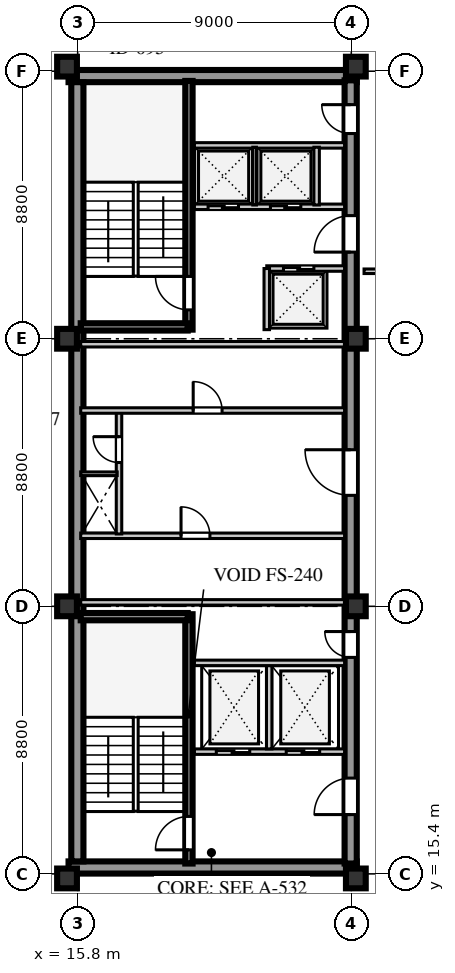
"""IFC4 building model, lengths in metres.
Left out: names, types, materials, properties, quantities, classifications, styles, units other than length and angle.
Written with IfcOpenShell. Run it as: python <this file> out.ifc"""

import sys

from ifc_helpers import new_model, si_unit, direction, frame, frame_2d, origin, origin_2d, place, context, subcontext, project, spatial, rectangle, extrude, element, fill, save


model = new_model("IFC4")
c1 = context("Model", 3, precision=1e-05, world=origin(), true_north=direction((0.0, 1.0)))
c2 = subcontext(c1, "Body", "Model", "MODEL_VIEW")
j1 = project(units=[si_unit("LENGTHUNIT", "METRE"), si_unit("PLANEANGLEUNIT", "RADIAN")], contexts=[c1])
p1 = place(None, origin())
s1 = spatial("IfcSite", under=j1, at=p1, CompositionType="ELEMENT")
p2 = place(p1, origin())
s2 = spatial("IfcBuilding", under=s1, at=p2, CompositionType="ELEMENT")
p3 = place(p2, frame((0.0, 0.0, 245.3)))
s3 = spatial("IfcBuildingStorey", under=s2, at=p3, CompositionType="ELEMENT", Elevation=245.3)
for number, where, z_axis, x_axis in (
    (1, (15.5, 15.61, 0.0), (0.0, 0.0, 1.0), (1.0, 0.0, 0.0)),
    (2, (15.5, 41.64, 0.0), (0.0, 0.0, 1.0), (1.0, 0.0, 0.0)),
):
    element("IfcWall", number, at=place(p3, frame(where, z_axis=z_axis, x_axis=x_axis)), inside=s3, PredefinedType="SHEAR", context=c2, shape_type="SweptSolid", body=[
        extrude(rectangle(XDim=9.48, YDim=0.4, at=frame_2d((4.74, 0.0))), origin(), (0.0, 0.0, 1.0), 3.66),
    ])
p4 = place(p3, frame((15.79, 15.81, 0.0), z_axis=(0.0, 0.0, 1.0), x_axis=(0.0, 1.0, 0.0)))
e3 = element("IfcWall", 3, at=p4, inside=s3, PredefinedType="SHEAR", context=c2, shape_type="SweptSolid", body=[
    extrude(rectangle(XDim=25.63, YDim=0.4, at=frame_2d((12.815, 0.0))), origin(), (0.0, 0.0, 1.0), 3.66),
])
p5 = place(p3, frame((24.78, 15.74, 0.0), z_axis=(0.0, 0.0, 1.0), x_axis=(0.0, 1.0, 0.0)))
e4 = element("IfcWall", 4, at=p5, inside=s3, PredefinedType="SHEAR", context=c2, shape_type="SweptSolid", body=[
    extrude(rectangle(XDim=25.76, YDim=0.4, at=frame_2d((12.88, 0.0))), origin(), (0.0, 0.0, 1.0), 3.66),
])
p6 = place(p5, frame((1.61, 0.0, 0.0)))
e5 = element("IfcOpeningElement", 5, at=p6, cuts=e4, PredefinedType="OPENING", context=c2, shape_type="SweptSolid", body=[
    extrude(rectangle(XDim=1.2, YDim=2.1, at=frame_2d((0.6, 1.05))), frame((0.0, 0.21, 0.0), z_axis=(0.0, -1.0, 0.0), x_axis=(1.0, 0.0, 0.0)), (0.0, 0.0, 1.0), 0.42),
])
p7 = place(p5, frame((6.78, 0.0, 0.0)))
e6 = element("IfcOpeningElement", 6, at=p7, cuts=e4, PredefinedType="OPENING", context=c2, shape_type="SweptSolid", body=[
    extrude(rectangle(XDim=0.85, YDim=2.06, at=frame_2d((0.425, 1.03))), frame((0.0, 0.21, 0.0), z_axis=(0.0, -1.0, 0.0), x_axis=(1.0, 0.0, 0.0)), (0.0, 0.0, 1.0), 0.42),
])
p8 = place(p5, frame((12.11, 0.0, 0.0)))
e7 = element("IfcOpeningElement", 7, at=p8, cuts=e4, PredefinedType="OPENING", context=c2, shape_type="SweptSolid", body=[
    extrude(rectangle(XDim=1.5, YDim=2.12, at=frame_2d((0.75, 1.06))), frame((0.0, 0.21, 0.0), z_axis=(0.0, -1.0, 0.0), x_axis=(1.0, 0.0, 0.0)), (0.0, 0.0, 1.0), 0.42),
])
p9 = place(p5, frame((20.11, 0.0, 0.0)))
e8 = element("IfcOpeningElement", 8, at=p9, cuts=e4, PredefinedType="OPENING", context=c2, shape_type="SweptSolid", body=[
    extrude(rectangle(XDim=1.2, YDim=2.12, at=frame_2d((0.6, 1.06))), frame((0.0, 0.21, 0.0), z_axis=(0.0, -1.0, 0.0), x_axis=(1.0, 0.0, 0.0)), (0.0, 0.0, 1.0), 0.42),
])
p10 = place(p5, frame((24.01, 0.0, 0.0)))
e9 = element("IfcOpeningElement", 9, at=p10, cuts=e4, PredefinedType="OPENING", context=c2, shape_type="SweptSolid", body=[
    extrude(rectangle(XDim=0.95, YDim=2.1, at=frame_2d((0.475, 1.05))), frame((0.0, 0.21, 0.0), z_axis=(0.0, -1.0, 0.0), x_axis=(1.0, 0.0, 0.0)), (0.0, 0.0, 1.0), 0.42),
])
for number, where, z_axis, x_axis in (
    (10, (15.45, 15.25, 0.0), (0.0, 0.0, 1.0), (1.0, 0.0, 0.0)),
    (11, (15.45, 24.2, 0.0), (0.0, 0.0, 1.0), (1.0, 0.0, 0.0)),
    (12, (15.45, 33.0, 0.0), (0.0, 0.0, 1.0), (1.0, 0.0, 0.0)),
    (13, (15.45, 41.95, 0.0), (0.0, 0.0, 1.0), (1.0, 0.0, 0.0)),
    (14, (24.95, 15.25, 0.0), (0.0, 0.0, 1.0), (1.0, 0.0, 0.0)),
    (15, (24.95, 24.2, 0.0), (0.0, 0.0, 1.0), (1.0, 0.0, 0.0)),
    (16, (24.95, 33.0, 0.0), (0.0, 0.0, 1.0), (1.0, 0.0, 0.0)),
    (17, (24.95, 41.95, 0.0), (0.0, 0.0, 1.0), (1.0, 0.0, 0.0)),
):
    element("IfcColumn", number, at=place(p3, frame(where, z_axis=z_axis, x_axis=x_axis)), inside=s3, PredefinedType="COLUMN", context=c2, shape_type="SweptSolid", body=[
        extrude(rectangle(XDim=0.65, YDim=0.65, at=origin_2d()), origin(), (0.0, 0.0, 1.0), 3.66),
    ])
p11 = place(p3, frame((19.46, 15.74, 0.0), z_axis=(0.0, 0.0, 1.0), x_axis=(0.0, 1.0, 0.0)))
e18 = element("IfcWall", 18, at=p11, inside=s3, PredefinedType="SHEAR", context=c2, shape_type="SweptSolid", body=[
    extrude(rectangle(XDim=8.2, YDim=0.24, at=frame_2d((4.1, 0.0))), origin(), (0.0, 0.0, 1.0), 3.9),
])
p12 = place(p11, frame((0.45, 0.0, 0.0)))
e19 = element("IfcOpeningElement", 19, at=p12, cuts=e18, PredefinedType="OPENING", context=c2, shape_type="SweptSolid", body=[
    extrude(rectangle(XDim=1.1, YDim=2.1, at=frame_2d((0.55, 1.05))), frame((0.0, 0.13, 0.0), z_axis=(0.0, -1.0, 0.0), x_axis=(1.0, 0.0, 0.0)), (0.0, 0.0, 1.0), 0.26),
])
p13 = place(p3, frame((15.9, 23.86, 0.0), z_axis=(0.0, 0.0, 1.0), x_axis=(1.0, 0.0, 0.0)))
e20 = element("IfcWall", 20, at=p13, inside=s3, PredefinedType="SHEAR", context=c2, shape_type="SweptSolid", body=[
    extrude(rectangle(XDim=3.52, YDim=0.24, at=frame_2d((1.76, 0.0))), origin(), (0.0, 0.0, 1.0), 3.9),
])
p14 = place(p3, frame((19.64, 19.42, 0.0), z_axis=(0.0, 0.0, 1.0), x_axis=(1.0, 0.0, 0.0)))
e21 = element("IfcWall", 21, at=p14, inside=s3, PredefinedType="SOLIDWALL", context=c2, shape_type="SweptSolid", body=[
    extrude(rectangle(XDim=4.94, YDim=0.18, at=frame_2d((2.47, 0.0))), origin(), (0.0, 0.0, 1.0), 3.66),
])
p15 = place(p14, frame((0.72, 0.0, 0.0)))
e22 = element("IfcOpeningElement", 22, at=p15, cuts=e21, PredefinedType="OPENING", context=c2, shape_type="SweptSolid", body=[
    extrude(rectangle(XDim=1.1, YDim=2.1, at=frame_2d((0.55, 1.05))), frame((0.0, 0.1, 0.0), z_axis=(0.0, -1.0, 0.0), x_axis=(1.0, 0.0, 0.0)), (0.0, 0.0, 1.0), 0.2),
])
p16 = place(p14, frame((3.02, 0.0, 0.0)))
e23 = element("IfcOpeningElement", 23, at=p16, cuts=e21, PredefinedType="OPENING", context=c2, shape_type="SweptSolid", body=[
    extrude(rectangle(XDim=1.1, YDim=2.1, at=frame_2d((0.55, 1.05))), frame((0.0, 0.1, 0.0), z_axis=(0.0, -1.0, 0.0), x_axis=(1.0, 0.0, 0.0)), (0.0, 0.0, 1.0), 0.2),
])
p17 = place(p3, frame((22.1, 19.51, 0.0), z_axis=(0.0, 0.0, 1.0), x_axis=(0.0, 1.0, 0.0)))
e24 = element("IfcWall", 24, at=p17, inside=s3, PredefinedType="SOLIDWALL", context=c2, shape_type="SweptSolid", body=[
    extrude(rectangle(XDim=2.74, YDim=0.18, at=frame_2d((1.37, 0.0))), origin(), (0.0, 0.0, 1.0), 3.66),
])
p18 = place(p3, frame((19.64, 22.34, 0.0), z_axis=(0.0, 0.0, 1.0), x_axis=(1.0, 0.0, 0.0)))
e25 = element("IfcWall", 25, at=p18, inside=s3, PredefinedType="SOLIDWALL", context=c2, shape_type="SweptSolid", body=[
    extrude(rectangle(XDim=4.94, YDim=0.18, at=frame_2d((2.47, 0.0))), origin(), (0.0, 0.0, 1.0), 3.66),
])
p19 = place(p3, frame((15.9, 26.52, 0.0), z_axis=(0.0, 0.0, 1.0), x_axis=(1.0, 0.0, 0.0)))
e26 = element("IfcWall", 26, at=p19, inside=s3, PredefinedType="SOLIDWALL", context=c2, shape_type="SweptSolid", body=[
    extrude(rectangle(XDim=8.68, YDim=0.18, at=frame_2d((4.34, 0.0))), origin(), (0.0, 0.0, 1.0), 3.66),
])
p20 = place(p19, frame((3.3, 0.0, 0.0)))
e27 = element("IfcOpeningElement", 27, at=p20, cuts=e26, PredefinedType="OPENING", context=c2, shape_type="SweptSolid", body=[
    extrude(rectangle(XDim=0.95, YDim=2.1, at=frame_2d((0.475, 1.05))), frame((0.0, 0.1, 0.0), z_axis=(0.0, -1.0, 0.0), x_axis=(1.0, 0.0, 0.0)), (0.0, 0.0, 1.0), 0.2),
])
p21 = place(p3, frame((15.9, 24.33, 0.0), z_axis=(0.0, 0.0, 1.0), x_axis=(1.0, 0.0, 0.0)))
e28 = element("IfcWall", 28, at=p21, inside=s3, PredefinedType="SOLIDWALL", context=c2, shape_type="SweptSolid", body=[
    extrude(rectangle(XDim=8.68, YDim=0.18, at=frame_2d((4.34, 0.0))), origin(), (0.0, 0.0, 1.0), 3.06),
])
p22 = place(p3, frame((17.16, 26.58, 0.0), z_axis=(0.0, 0.0, 1.0), x_axis=(0.0, 1.0, 0.0)))
e29 = element("IfcWall", 29, at=p22, inside=s3, PredefinedType="SOLIDWALL", context=c2, shape_type="SweptSolid", body=[
    extrude(rectangle(XDim=4.02, YDim=0.18, at=frame_2d((2.01, 0.0))), origin(), (0.0, 0.0, 1.0), 3.66),
])
p23 = place(p22, frame((2.35, 0.0, 0.0)))
e30 = element("IfcOpeningElement", 30, at=p23, cuts=e29, PredefinedType="OPENING", context=c2, shape_type="SweptSolid", body=[
    extrude(rectangle(XDim=0.85, YDim=2.06, at=frame_2d((0.425, 1.03))), frame((0.0, 0.1, 0.0), z_axis=(0.0, -1.0, 0.0), x_axis=(1.0, 0.0, 0.0)), (0.0, 0.0, 1.0), 0.2),
])
p24 = place(p3, frame((15.9, 28.56, 0.0), z_axis=(0.0, 0.0, 1.0), x_axis=(1.0, 0.0, 0.0)))
e31 = element("IfcWall", 31, at=p24, inside=s3, PredefinedType="PARTITIONING", context=c2, shape_type="SweptSolid", body=[
    extrude(rectangle(XDim=1.2, YDim=0.12, at=frame_2d((0.6, 0.0))), origin(), (0.0, 0.0, 1.0), 3.66),
])
p25 = place(p3, frame((15.9, 30.64, 0.0), z_axis=(0.0, 0.0, 1.0), x_axis=(1.0, 0.0, 0.0)))
e32 = element("IfcWall", 32, at=p25, inside=s3, PredefinedType="SOLIDWALL", context=c2, shape_type="SweptSolid", body=[
    extrude(rectangle(XDim=8.68, YDim=0.18, at=frame_2d((4.34, 0.0))), origin(), (0.0, 0.0, 1.0), 3.66),
])
p26 = place(p25, frame((3.7, 0.0, 0.0)))
e33 = element("IfcOpeningElement", 33, at=p26, cuts=e32, PredefinedType="OPENING", context=c2, shape_type="SweptSolid", body=[
    extrude(rectangle(XDim=0.95, YDim=2.1, at=frame_2d((0.475, 1.05))), frame((0.0, 0.1, 0.0), z_axis=(0.0, -1.0, 0.0), x_axis=(1.0, 0.0, 0.0)), (0.0, 0.0, 1.0), 0.2),
])
p27 = place(p3, frame((15.9, 32.82, 0.0), z_axis=(0.0, 0.0, 1.0), x_axis=(1.0, 0.0, 0.0)))
e34 = element("IfcWall", 34, at=p27, inside=s3, PredefinedType="SOLIDWALL", context=c2, shape_type="SweptSolid", body=[
    extrude(rectangle(XDim=8.68, YDim=0.18, at=frame_2d((4.34, 0.0))), origin(), (0.0, 0.0, 1.0), 3.06),
])
p28 = place(p3, frame((19.46, 33.3, 0.0), z_axis=(0.0, 0.0, 1.0), x_axis=(0.0, 1.0, 0.0)))
e35 = element("IfcWall", 35, at=p28, inside=s3, PredefinedType="SHEAR", context=c2, shape_type="SweptSolid", body=[
    extrude(rectangle(XDim=8.18, YDim=0.24, at=frame_2d((4.09, 0.0))), origin(), (0.0, 0.0, 1.0), 3.9),
])
p29 = place(p28, frame((0.65, 0.0, 0.0)))
e36 = element("IfcOpeningElement", 36, at=p29, cuts=e35, PredefinedType="OPENING", context=c2, shape_type="SweptSolid", body=[
    extrude(rectangle(XDim=1.1, YDim=2.1, at=frame_2d((0.55, 1.05))), frame((0.0, 0.13, 0.0), z_axis=(0.0, -1.0, 0.0), x_axis=(1.0, 0.0, 0.0)), (0.0, 0.0, 1.0), 0.26),
])
p30 = place(p3, frame((15.9, 33.39, 0.0), z_axis=(0.0, 0.0, 1.0), x_axis=(1.0, 0.0, 0.0)))
e37 = element("IfcWall", 37, at=p30, inside=s3, PredefinedType="SHEAR", context=c2, shape_type="SweptSolid", body=[
    extrude(rectangle(XDim=3.52, YDim=0.24, at=frame_2d((1.76, 0.0))), origin(), (0.0, 0.0, 1.0), 3.9),
])
p31 = place(p3, frame((22.02, 35.31, 0.0), z_axis=(0.0, 0.0, 1.0), x_axis=(1.0, 0.0, 0.0)))
e38 = element("IfcWall", 38, at=p31, inside=s3, PredefinedType="SOLIDWALL", context=c2, shape_type="SweptSolid", body=[
    extrude(rectangle(XDim=2.56, YDim=0.18, at=frame_2d((1.28, 0.0))), origin(), (0.0, 0.0, 1.0), 3.66),
])
p32 = place(p31, frame((0.55, 0.0, 0.0)))
e39 = element("IfcOpeningElement", 39, at=p32, cuts=e38, PredefinedType="OPENING", context=c2, shape_type="SweptSolid", body=[
    extrude(rectangle(XDim=1.0, YDim=2.1, at=frame_2d((0.5, 1.05))), frame((0.0, 0.1, 0.0), z_axis=(0.0, -1.0, 0.0), x_axis=(1.0, 0.0, 0.0)), (0.0, 0.0, 1.0), 0.2),
])
p33 = place(p3, frame((22.02, 33.3, 0.0), z_axis=(0.0, 0.0, 1.0), x_axis=(0.0, 1.0, 0.0)))
e40 = element("IfcWall", 40, at=p33, inside=s3, PredefinedType="SOLIDWALL", context=c2, shape_type="SweptSolid", body=[
    extrude(rectangle(XDim=2.01, YDim=0.18, at=frame_2d((1.005, 0.0))), origin(), (0.0, 0.0, 1.0), 3.66),
])
p34 = place(p3, frame((19.64, 37.34, 0.0), z_axis=(0.0, 0.0, 1.0), x_axis=(1.0, 0.0, 0.0)))
e41 = element("IfcWall", 41, at=p34, inside=s3, PredefinedType="SOLIDWALL", context=c2, shape_type="SweptSolid", body=[
    extrude(rectangle(XDim=4.94, YDim=0.18, at=frame_2d((2.47, 0.0))), origin(), (0.0, 0.0, 1.0), 3.66),
])
p35 = place(p34, frame((0.45, 0.0, 0.0)))
e42 = element("IfcOpeningElement", 42, at=p35, cuts=e41, PredefinedType="OPENING", context=c2, shape_type="SweptSolid", body=[
    extrude(rectangle(XDim=1.0, YDim=2.1, at=frame_2d((0.5, 1.05))), frame((0.0, 0.1, 0.0), z_axis=(0.0, -1.0, 0.0), x_axis=(1.0, 0.0, 0.0)), (0.0, 0.0, 1.0), 0.2),
])
p36 = place(p34, frame((2.5, 0.0, 0.0)))
e43 = element("IfcOpeningElement", 43, at=p36, cuts=e41, PredefinedType="OPENING", context=c2, shape_type="SweptSolid", body=[
    extrude(rectangle(XDim=1.0, YDim=2.1, at=frame_2d((0.5, 1.05))), frame((0.0, 0.1, 0.0), z_axis=(0.0, -1.0, 0.0), x_axis=(1.0, 0.0, 0.0)), (0.0, 0.0, 1.0), 0.2),
])
p37 = place(p3, frame((19.64, 39.36, 0.0), z_axis=(0.0, 0.0, 1.0), x_axis=(1.0, 0.0, 0.0)))
e44 = element("IfcWall", 44, at=p37, inside=s3, PredefinedType="SOLIDWALL", context=c2, shape_type="SweptSolid", body=[
    extrude(rectangle(XDim=4.94, YDim=0.18, at=frame_2d((2.47, 0.0))), origin(), (0.0, 0.0, 1.0), 3.66),
])
p38 = place(p3, frame((21.62, 37.4, 0.0), z_axis=(0.0, 0.0, 1.0), x_axis=(0.0, 1.0, 0.0)))
e45 = element("IfcWall", 45, at=p38, inside=s3, PredefinedType="PARTITIONING", context=c2, shape_type="SweptSolid", body=[
    extrude(rectangle(XDim=1.9, YDim=0.12, at=frame_2d((0.95, 0.0))), origin(), (0.0, 0.0, 1.0), 3.66),
])
p39 = place(p3, frame((23.66, 37.4, 0.0), z_axis=(0.0, 0.0, 1.0), x_axis=(0.0, 1.0, 0.0)))
e46 = element("IfcWall", 46, at=p39, inside=s3, PredefinedType="SOLIDWALL", context=c2, shape_type="SweptSolid", body=[
    extrude(rectangle(XDim=1.9, YDim=0.18, at=frame_2d((0.95, 0.0))), origin(), (0.0, 0.0, 1.0), 3.66),
])
p40 = place(p3, frame((25.22, 35.22, 0.0), z_axis=(0.0, 0.0, 1.0), x_axis=(1.0, 0.0, 0.0)))
e47 = element("IfcWall", 47, at=p40, inside=s3, PredefinedType="PARTITIONING", context=c2, shape_type="SweptSolid", body=[
    extrude(rectangle(XDim=9.5, YDim=0.15, at=frame_2d((4.75, 0.0))), origin(), (0.0, 0.0, 1.0), 3.66),
])
p41 = place(p40, frame((1.8, 0.0, 0.0)))
e48 = element("IfcOpeningElement", 48, at=p41, cuts=e47, PredefinedType="OPENING", context=c2, shape_type="SweptSolid", body=[
    extrude(rectangle(XDim=1.1, YDim=2.08, at=frame_2d((0.55, 1.04))), frame((0.0, 0.085, 0.0), z_axis=(0.0, -1.0, 0.0), x_axis=(1.0, 0.0, 0.0)), (0.0, 0.0, 1.0), 0.17),
])
p42 = place(p12, origin())
e49 = element("IfcDoor", 49, at=p42, inside=s3, OperationType="SINGLE_SWING_LEFT", PredefinedType="DOOR", context=c2, shape_type="SweptSolid", body=[
    extrude(rectangle(XDim=1.1, YDim=2.1, at=frame_2d((0.55, 1.05))), frame((0.0, 0.025, 0.0), z_axis=(0.0, -1.0, 0.0), x_axis=(1.0, 0.0, 0.0)), (0.0, 0.0, 1.0), 0.05),
])
fill(e19, e49)
p43 = place(p15, origin())
e50 = element("IfcDoor", 50, at=p43, inside=s3, OperationType="DOUBLE_DOOR_SLIDING", PredefinedType="DOOR", context=c2, shape_type="SweptSolid", body=[
    extrude(rectangle(XDim=1.1, YDim=2.1, at=frame_2d((0.55, 1.05))), frame((0.0, 0.025, 0.0), z_axis=(0.0, -1.0, 0.0), x_axis=(1.0, 0.0, 0.0)), (0.0, 0.0, 1.0), 0.05),
])
fill(e22, e50)
p44 = place(p16, origin())
e51 = element("IfcDoor", 51, at=p44, inside=s3, OperationType="DOUBLE_DOOR_SLIDING", PredefinedType="DOOR", context=c2, shape_type="SweptSolid", body=[
    extrude(rectangle(XDim=1.1, YDim=2.1, at=frame_2d((0.55, 1.05))), frame((0.0, 0.025, 0.0), z_axis=(0.0, -1.0, 0.0), x_axis=(1.0, 0.0, 0.0)), (0.0, 0.0, 1.0), 0.05),
])
fill(e23, e51)
p45 = place(p6, frame((1.2, 0.0, 0.0), z_axis=(0.0, 0.0, 1.0), x_axis=(-1.0, 0.0, 0.0)))
e52 = element("IfcDoor", 52, at=p45, inside=s3, OperationType="SINGLE_SWING_RIGHT", PredefinedType="DOOR", context=c2, shape_type="SweptSolid", body=[
    extrude(rectangle(XDim=1.2, YDim=2.1, at=frame_2d((0.6, 1.05))), frame((0.0, 0.025, 0.0), z_axis=(0.0, -1.0, 0.0), x_axis=(1.0, 0.0, 0.0)), (0.0, 0.0, 1.0), 0.05),
])
fill(e5, e52)
p46 = place(p7, frame((0.85, 0.0, 0.0), z_axis=(0.0, 0.0, 1.0), x_axis=(-1.0, 0.0, 0.0)))
e53 = element("IfcDoor", 53, at=p46, inside=s3, OperationType="SINGLE_SWING_LEFT", PredefinedType="DOOR", context=c2, shape_type="SweptSolid", body=[
    extrude(rectangle(XDim=0.85, YDim=2.06, at=frame_2d((0.425, 1.03))), frame((0.0, 0.025, 0.0), z_axis=(0.0, -1.0, 0.0), x_axis=(1.0, 0.0, 0.0)), (0.0, 0.0, 1.0), 0.05),
])
fill(e6, e53)
p47 = place(p20, origin())
e54 = element("IfcDoor", 54, at=p47, inside=s3, OperationType="SINGLE_SWING_LEFT", PredefinedType="DOOR", context=c2, shape_type="SweptSolid", body=[
    extrude(rectangle(XDim=0.95, YDim=2.1, at=frame_2d((0.475, 1.05))), frame((0.0, 0.025, 0.0), z_axis=(0.0, -1.0, 0.0), x_axis=(1.0, 0.0, 0.0)), (0.0, 0.0, 1.0), 0.05),
])
fill(e27, e54)
p48 = place(p23, origin())
e55 = element("IfcDoor", 55, at=p48, inside=s3, OperationType="SINGLE_SWING_RIGHT", PredefinedType="DOOR", context=c2, shape_type="SweptSolid", body=[
    extrude(rectangle(XDim=0.85, YDim=2.06, at=frame_2d((0.425, 1.03))), frame((0.0, 0.025, 0.0), z_axis=(0.0, -1.0, 0.0), x_axis=(1.0, 0.0, 0.0)), (0.0, 0.0, 1.0), 0.05),
])
fill(e30, e55)
p49 = place(p8, frame((1.5, 0.0, 0.0), z_axis=(0.0, 0.0, 1.0), x_axis=(-1.0, 0.0, 0.0)))
e56 = element("IfcDoor", 56, at=p49, inside=s3, OperationType="SINGLE_SWING_LEFT", PredefinedType="DOOR", context=c2, shape_type="SweptSolid", body=[
    extrude(rectangle(XDim=1.5, YDim=2.12, at=frame_2d((0.75, 1.06))), frame((0.0, 0.025, 0.0), z_axis=(0.0, -1.0, 0.0), x_axis=(1.0, 0.0, 0.0)), (0.0, 0.0, 1.0), 0.05),
])
fill(e7, e56)
p50 = place(p26, frame((0.95, 0.0, 0.0), z_axis=(0.0, 0.0, 1.0), x_axis=(-1.0, 0.0, 0.0)))
e57 = element("IfcDoor", 57, at=p50, inside=s3, OperationType="SINGLE_SWING_RIGHT", PredefinedType="DOOR", context=c2, shape_type="SweptSolid", body=[
    extrude(rectangle(XDim=0.95, YDim=2.1, at=frame_2d((0.475, 1.05))), frame((0.0, 0.025, 0.0), z_axis=(0.0, -1.0, 0.0), x_axis=(1.0, 0.0, 0.0)), (0.0, 0.0, 1.0), 0.05),
])
fill(e33, e57)
p51 = place(p29, origin())
e58 = element("IfcDoor", 58, at=p51, inside=s3, OperationType="SINGLE_SWING_RIGHT", PredefinedType="DOOR", context=c2, shape_type="SweptSolid", body=[
    extrude(rectangle(XDim=1.1, YDim=2.1, at=frame_2d((0.55, 1.05))), frame((0.0, 0.025, 0.0), z_axis=(0.0, -1.0, 0.0), x_axis=(1.0, 0.0, 0.0)), (0.0, 0.0, 1.0), 0.05),
])
fill(e36, e58)
p52 = place(p9, frame((1.2, 0.0, 0.0), z_axis=(0.0, 0.0, 1.0), x_axis=(-1.0, 0.0, 0.0)))
e59 = element("IfcDoor", 59, at=p52, inside=s3, OperationType="SINGLE_SWING_RIGHT", PredefinedType="DOOR", context=c2, shape_type="SweptSolid", body=[
    extrude(rectangle(XDim=1.2, YDim=2.12, at=frame_2d((0.6, 1.06))), frame((0.0, 0.025, 0.0), z_axis=(0.0, -1.0, 0.0), x_axis=(1.0, 0.0, 0.0)), (0.0, 0.0, 1.0), 0.05),
])
fill(e8, e59)
p53 = place(p35, frame((1.0, 0.0, 0.0), z_axis=(0.0, 0.0, 1.0), x_axis=(-1.0, 0.0, 0.0)))
e60 = element("IfcDoor", 60, at=p53, inside=s3, OperationType="DOUBLE_DOOR_SLIDING", PredefinedType="DOOR", context=c2, shape_type="SweptSolid", body=[
    extrude(rectangle(XDim=1.0, YDim=2.1, at=frame_2d((0.5, 1.05))), frame((0.0, 0.025, 0.0), z_axis=(0.0, -1.0, 0.0), x_axis=(1.0, 0.0, 0.0)), (0.0, 0.0, 1.0), 0.05),
])
fill(e42, e60)
p54 = place(p36, frame((1.0, 0.0, 0.0), z_axis=(0.0, 0.0, 1.0), x_axis=(-1.0, 0.0, 0.0)))
e61 = element("IfcDoor", 61, at=p54, inside=s3, OperationType="DOUBLE_DOOR_SLIDING", PredefinedType="DOOR", context=c2, shape_type="SweptSolid", body=[
    extrude(rectangle(XDim=1.0, YDim=2.1, at=frame_2d((0.5, 1.05))), frame((0.0, 0.025, 0.0), z_axis=(0.0, -1.0, 0.0), x_axis=(1.0, 0.0, 0.0)), (0.0, 0.0, 1.0), 0.05),
])
fill(e43, e61)
p55 = place(p32, origin())
e62 = element("IfcDoor", 62, at=p55, inside=s3, OperationType="DOUBLE_DOOR_SLIDING", PredefinedType="DOOR", context=c2, shape_type="SweptSolid", body=[
    extrude(rectangle(XDim=1.0, YDim=2.1, at=frame_2d((0.5, 1.05))), frame((0.0, 0.025, 0.0), z_axis=(0.0, -1.0, 0.0), x_axis=(1.0, 0.0, 0.0)), (0.0, 0.0, 1.0), 0.05),
])
fill(e39, e62)
p56 = place(p10, frame((0.95, 0.0, 0.0), z_axis=(0.0, 0.0, 1.0), x_axis=(-1.0, 0.0, 0.0)))
e63 = element("IfcDoor", 63, at=p56, inside=s3, OperationType="SINGLE_SWING_LEFT", PredefinedType="DOOR", context=c2, shape_type="SweptSolid", body=[
    extrude(rectangle(XDim=0.95, YDim=2.1, at=frame_2d((0.475, 1.05))), frame((0.0, 0.025, 0.0), z_axis=(0.0, -1.0, 0.0), x_axis=(1.0, 0.0, 0.0)), (0.0, 0.0, 1.0), 0.05),
])
fill(e9, e63)
save(model, sys.argv[1])
